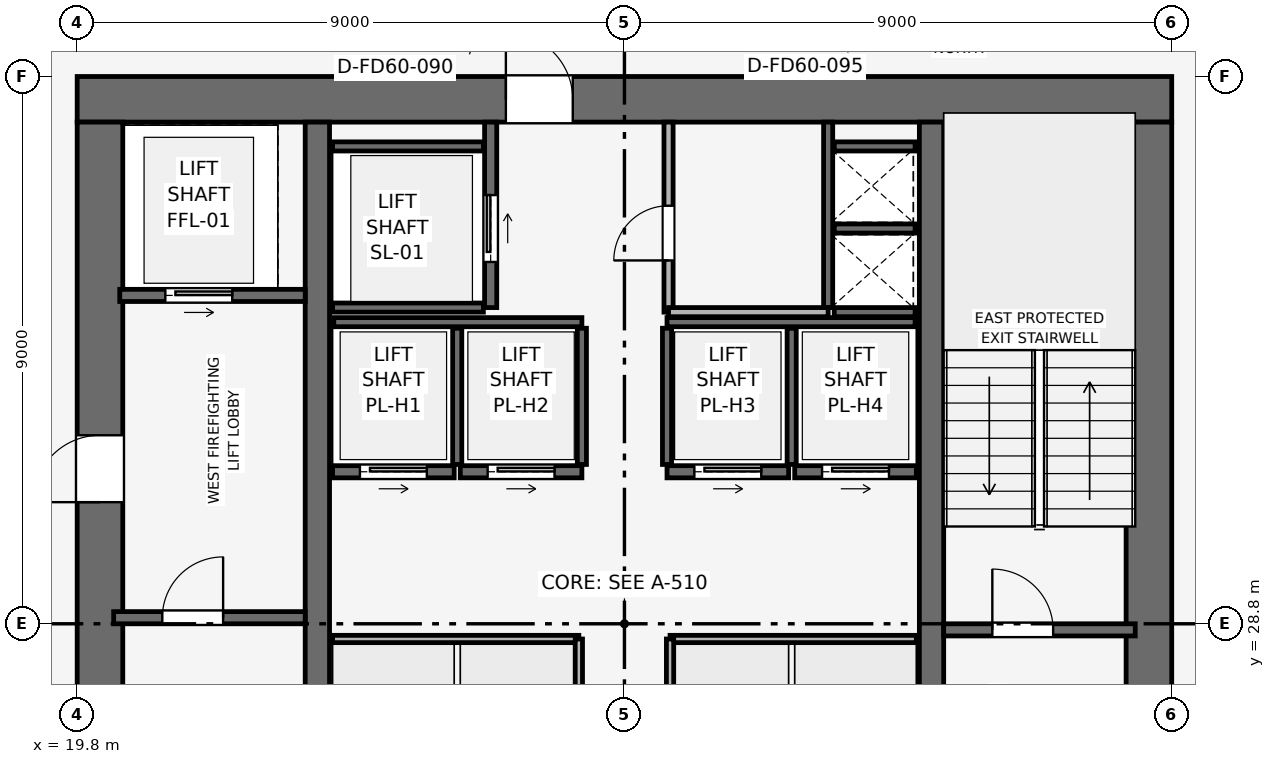
"""IFC4 building model, lengths in metres.
Left out: names, types, materials, properties, quantities, classifications, styles, units other than length and angle.
Written with IfcOpenShell. Run it as: python <this file> out.ifc"""

import sys

from ifc_helpers import new_model, si_unit, direction, frame, frame_2d, origin, place, context, subcontext, project, spatial, rectangle, extrude, element, fill, save


model = new_model("IFC4")
c1 = context("Model", 3, precision=1e-05, world=origin(), true_north=direction((0.0, 1.0)))
c2 = subcontext(c1, "Body", "Model", "MODEL_VIEW")
j1 = project(units=[si_unit("LENGTHUNIT", "METRE"), si_unit("PLANEANGLEUNIT", "RADIAN")], contexts=[c1])
p1 = place(None, origin())
s1 = spatial("IfcSite", under=j1, at=p1, CompositionType="ELEMENT")
p2 = place(p1, origin())
s2 = spatial("IfcBuilding", under=s1, at=p2, CompositionType="ELEMENT")
p3 = place(p2, frame((0.0, 0.0, 272.85)))
s3 = spatial("IfcBuildingStorey", under=s2, at=p3, CompositionType="ELEMENT", Elevation=272.85)
p4 = place(p3, frame((19.8, 37.425, 0.0), z_axis=(0.0, 0.0, 1.0), x_axis=(1.0, 0.0, 0.0)))
e1 = element("IfcWall", 1, at=p4, inside=s3, PredefinedType="SHEAR", context=c2, shape_type="SweptSolid", body=[
    extrude(rectangle(XDim=18.0, YDim=0.75, at=frame_2d((9.0, 0.0))), origin(), (0.0, 0.0, 1.0), 3.75),
])
p5 = place(p4, frame((7.05, 0.0, 0.0)))
e2 = element("IfcOpeningElement", 2, at=p5, cuts=e1, PredefinedType="OPENING", context=c2, shape_type="SweptSolid", body=[
    extrude(rectangle(XDim=1.1, YDim=2.15, at=frame_2d((0.55, 1.075))), frame((0.0, 0.385, 0.0), z_axis=(0.0, -1.0, 0.0), x_axis=(1.0, 0.0, 0.0)), (0.0, 0.0, 1.0), 0.77),
])
p6 = place(p3, frame((20.175, 20.55, 0.0), z_axis=(0.0, 0.0, 1.0), x_axis=(0.0, 1.0, 0.0)))
e3 = element("IfcWall", 3, at=p6, inside=s3, PredefinedType="SHEAR", context=c2, shape_type="SweptSolid", body=[
    extrude(rectangle(XDim=16.5, YDim=0.75, at=frame_2d((8.25, 0.0))), origin(), (0.0, 0.0, 1.0), 3.75),
])
p7 = place(p6, frame((10.25, 0.0, 0.0)))
e4 = element("IfcOpeningElement", 4, at=p7, cuts=e3, PredefinedType="OPENING", context=c2, shape_type="SweptSolid", body=[
    extrude(rectangle(XDim=1.1, YDim=2.15, at=frame_2d((0.55, 1.075))), frame((0.0, 0.385, 0.0), z_axis=(0.0, -1.0, 0.0), x_axis=(1.0, 0.0, 0.0)), (0.0, 0.0, 1.0), 0.77),
])
p8 = place(p3, frame((37.425, 20.55, 0.0), z_axis=(0.0, 0.0, 1.0), x_axis=(0.0, 1.0, 0.0)))
e5 = element("IfcWall", 5, at=p8, inside=s3, PredefinedType="SHEAR", context=c2, shape_type="SweptSolid", body=[
    extrude(rectangle(XDim=16.5, YDim=0.75, at=frame_2d((8.25, 0.0))), origin(), (0.0, 0.0, 1.0), 3.75),
])
p9 = place(p8, frame((4.75, 0.0, 0.0)))
e6 = element("IfcOpeningElement", 6, at=p9, cuts=e5, PredefinedType="OPENING", context=c2, shape_type="SweptSolid", body=[
    extrude(rectangle(XDim=1.1, YDim=2.15, at=frame_2d((0.55, 1.075))), frame((0.0, 0.385, 0.0), z_axis=(0.0, -1.0, 0.0), x_axis=(1.0, 0.0, 0.0)), (0.0, 0.0, 1.0), 0.77),
])
for number, where, z_axis, x_axis in (
    (7, (23.75, 20.55, 0.0), (0.0, 0.0, 1.0), (0.0, 1.0, 0.0)),
    (8, (33.85, 20.55, 0.0), (0.0, 0.0, 1.0), (0.0, 1.0, 0.0)),
):
    element("IfcWall", number, at=place(p3, frame(where, z_axis=z_axis, x_axis=x_axis)), inside=s3, PredefinedType="SHEAR", context=c2, shape_type="SweptSolid", body=[
        extrude(rectangle(XDim=16.5, YDim=0.4, at=frame_2d((8.25, 0.0))), origin(), (0.0, 0.0, 1.0), 3.75),
    ])
p10 = place(p3, frame((20.4, 28.9, 0.0), z_axis=(0.0, 0.0, 1.0), x_axis=(1.0, 0.0, 0.0)))
e9 = element("IfcWall", 9, at=p10, inside=s3, PredefinedType="SHEAR", context=c2, shape_type="SweptSolid", body=[
    extrude(rectangle(XDim=3.15, YDim=0.2, at=frame_2d((1.575, 0.0))), origin(), (0.0, 0.0, 1.0), 3.5),
])
p11 = place(p10, frame((0.8, 0.0, 0.0)))
e10 = element("IfcOpeningElement", 10, at=p11, cuts=e9, PredefinedType="OPENING", context=c2, shape_type="SweptSolid", body=[
    extrude(rectangle(XDim=1.0, YDim=2.1, at=frame_2d((0.5, 1.05))), frame((0.0, 0.11, 0.0), z_axis=(0.0, -1.0, 0.0), x_axis=(1.0, 0.0, 0.0)), (0.0, 0.0, 1.0), 0.22),
])
p12 = place(p3, frame((34.05, 28.7, 0.0), z_axis=(0.0, 0.0, 1.0), x_axis=(1.0, 0.0, 0.0)))
e11 = element("IfcWall", 11, at=p12, inside=s3, PredefinedType="SHEAR", context=c2, shape_type="SweptSolid", body=[
    extrude(rectangle(XDim=3.15, YDim=0.2, at=frame_2d((1.575, 0.0))), origin(), (0.0, 0.0, 1.0), 3.5),
])
p13 = place(p12, frame((0.8, 0.0, 0.0)))
e12 = element("IfcOpeningElement", 12, at=p13, cuts=e11, PredefinedType="OPENING", context=c2, shape_type="SweptSolid", body=[
    extrude(rectangle(XDim=1.0, YDim=2.1, at=frame_2d((0.5, 1.05))), frame((0.0, 0.11, 0.0), z_axis=(0.0, -1.0, 0.0), x_axis=(1.0, 0.0, 0.0)), (0.0, 0.0, 1.0), 0.22),
])
p14 = place(p3, frame((32.15, 34.0, 0.0), z_axis=(0.0, 0.0, 1.0), x_axis=(0.0, 1.0, 0.0)))
e13 = element("IfcWall", 13, at=p14, inside=s3, PredefinedType="SHEAR", context=c2, shape_type="SweptSolid", body=[
    extrude(rectangle(XDim=3.05, YDim=0.15, at=frame_2d((1.525, 0.0))), origin(), (0.0, 0.0, 1.0), 3.5),
])
for number, where, z_axis, x_axis in (
    (14, (32.25, 33.925, 0.0), (0.0, 0.0, 1.0), (1.0, 0.0, 0.0)),
    (15, (32.25, 35.3, 0.0), (0.0, 0.0, 1.0), (1.0, 0.0, 0.0)),
):
    element("IfcWall", number, at=place(p3, frame(where, z_axis=z_axis, x_axis=x_axis)), inside=s3, PredefinedType="SHEAR", context=c2, shape_type="SweptSolid", body=[
        extrude(rectangle(XDim=1.33, YDim=0.15, at=frame_2d((0.665, 0.0))), origin(), (0.0, 0.0, 1.0), 3.5),
    ])
p15 = place(p3, frame((20.5, 34.2, 0.0), z_axis=(0.0, 0.0, 1.0), x_axis=(1.0, 0.0, 0.0)))
e16 = element("IfcWall", 16, at=p15, inside=s3, PredefinedType="SHEAR", context=c2, shape_type="SweptSolid", body=[
    extrude(rectangle(XDim=3.05, YDim=0.2, at=frame_2d((1.525, 0.0))), origin(), (0.0, 0.0, 1.0), 3.5),
])
p16 = place(p15, frame((0.75, 0.0, 0.0)))
e17 = element("IfcOpeningElement", 17, at=p16, cuts=e16, PredefinedType="OPENING", context=c2, shape_type="SweptSolid", body=[
    extrude(rectangle(XDim=1.1, YDim=2.15, at=frame_2d((0.55, 1.075))), frame((0.0, 0.11, 0.0), z_axis=(0.0, -1.0, 0.0), x_axis=(1.0, 0.0, 0.0)), (0.0, 0.0, 1.0), 0.22),
])
p17 = place(p3, frame((26.6, 34.0, 0.0), z_axis=(0.0, 0.0, 1.0), x_axis=(0.0, 1.0, 0.0)))
e18 = element("IfcWall", 18, at=p17, inside=s3, PredefinedType="SHEAR", context=c2, shape_type="SweptSolid", body=[
    extrude(rectangle(XDim=3.05, YDim=0.2, at=frame_2d((1.525, 0.0))), origin(), (0.0, 0.0, 1.0), 3.5),
])
p18 = place(p17, frame((0.75, 0.0, 0.0)))
e19 = element("IfcOpeningElement", 19, at=p18, cuts=e18, PredefinedType="OPENING", context=c2, shape_type="SweptSolid", body=[
    extrude(rectangle(XDim=1.1, YDim=2.15, at=frame_2d((0.55, 1.075))), frame((0.0, 0.11, 0.0), z_axis=(0.0, -1.0, 0.0), x_axis=(1.0, 0.0, 0.0)), (0.0, 0.0, 1.0), 0.22),
])
for number, where, z_axis, x_axis in (
    (20, (24.0, 34.0, 0.0), (0.0, 0.0, 1.0), (1.0, 0.0, 0.0)),
    (21, (24.0, 36.65, 0.0), (0.0, 0.0, 1.0), (1.0, 0.0, 0.0)),
):
    element("IfcWall", number, at=place(p3, frame(where, z_axis=z_axis, x_axis=x_axis)), inside=s3, PredefinedType="SHEAR", context=c2, shape_type="SweptSolid", body=[
        extrude(rectangle(XDim=2.48, YDim=0.15, at=frame_2d((1.24, 0.0))), origin(), (0.0, 0.0, 1.0), 3.5),
    ])
p19 = place(p3, frame((24.0, 31.3, 0.0), z_axis=(0.0, 0.0, 1.0), x_axis=(1.0, 0.0, 0.0)))
e22 = element("IfcWall", 22, at=p19, inside=s3, PredefinedType="SHEAR", context=c2, shape_type="SweptSolid", body=[
    extrude(rectangle(XDim=2.0, YDim=0.2, at=frame_2d((1.0, 0.0))), origin(), (0.0, 0.0, 1.0), 3.5),
])
p20 = place(p19, frame((0.45, 0.0, 0.0)))
e23 = element("IfcOpeningElement", 23, at=p20, cuts=e22, PredefinedType="OPENING", context=c2, shape_type="SweptSolid", body=[
    extrude(rectangle(XDim=1.1, YDim=2.15, at=frame_2d((0.55, 1.075))), frame((0.0, 0.11, 0.0), z_axis=(0.0, -1.0, 0.0), x_axis=(1.0, 0.0, 0.0)), (0.0, 0.0, 1.0), 0.22),
])
p21 = place(p3, frame((26.1, 31.3, 0.0), z_axis=(0.0, 0.0, 1.0), x_axis=(1.0, 0.0, 0.0)))
e24 = element("IfcWall", 24, at=p21, inside=s3, PredefinedType="SHEAR", context=c2, shape_type="SweptSolid", body=[
    extrude(rectangle(XDim=2.0, YDim=0.2, at=frame_2d((1.0, 0.0))), origin(), (0.0, 0.0, 1.0), 3.5),
])
p22 = place(p21, frame((0.45, 0.0, 0.0)))
e25 = element("IfcOpeningElement", 25, at=p22, cuts=e24, PredefinedType="OPENING", context=c2, shape_type="SweptSolid", body=[
    extrude(rectangle(XDim=1.1, YDim=2.15, at=frame_2d((0.55, 1.075))), frame((0.0, 0.11, 0.0), z_axis=(0.0, -1.0, 0.0), x_axis=(1.0, 0.0, 0.0)), (0.0, 0.0, 1.0), 0.22),
])
p23 = place(p3, frame((29.5, 31.3, 0.0), z_axis=(0.0, 0.0, 1.0), x_axis=(1.0, 0.0, 0.0)))
e26 = element("IfcWall", 26, at=p23, inside=s3, PredefinedType="SHEAR", context=c2, shape_type="SweptSolid", body=[
    extrude(rectangle(XDim=2.0, YDim=0.2, at=frame_2d((1.0, 0.0))), origin(), (0.0, 0.0, 1.0), 3.5),
])
p24 = place(p23, frame((0.45, 0.0, 0.0)))
e27 = element("IfcOpeningElement", 27, at=p24, cuts=e26, PredefinedType="OPENING", context=c2, shape_type="SweptSolid", body=[
    extrude(rectangle(XDim=1.1, YDim=2.15, at=frame_2d((0.55, 1.075))), frame((0.0, 0.11, 0.0), z_axis=(0.0, -1.0, 0.0), x_axis=(1.0, 0.0, 0.0)), (0.0, 0.0, 1.0), 0.22),
])
p25 = place(p3, frame((31.6, 31.3, 0.0), z_axis=(0.0, 0.0, 1.0), x_axis=(1.0, 0.0, 0.0)))
e28 = element("IfcWall", 28, at=p25, inside=s3, PredefinedType="SHEAR", context=c2, shape_type="SweptSolid", body=[
    extrude(rectangle(XDim=2.0, YDim=0.2, at=frame_2d((1.0, 0.0))), origin(), (0.0, 0.0, 1.0), 3.5),
])
p26 = place(p25, frame((0.45, 0.0, 0.0)))
e29 = element("IfcOpeningElement", 29, at=p26, cuts=e28, PredefinedType="OPENING", context=c2, shape_type="SweptSolid", body=[
    extrude(rectangle(XDim=1.1, YDim=2.15, at=frame_2d((0.55, 1.075))), frame((0.0, 0.11, 0.0), z_axis=(0.0, -1.0, 0.0), x_axis=(1.0, 0.0, 0.0)), (0.0, 0.0, 1.0), 0.22),
])
p27 = place(p3, frame((32.25, 36.65, 0.0), z_axis=(0.0, 0.0, 1.0), x_axis=(1.0, 0.0, 0.0)))
e30 = element("IfcWall", 30, at=p27, inside=s3, PredefinedType="SHEAR", context=c2, shape_type="SweptSolid", body=[
    extrude(rectangle(XDim=1.33, YDim=0.15, at=frame_2d((0.665, 0.0))), origin(), (0.0, 0.0, 1.0), 3.5),
])
for number, where, z_axis, x_axis in (
    (31, (24.02, 33.76, 0.0), (0.0, 0.0, 1.0), (1.0, 0.0, 0.0)),
    (32, (29.5, 33.76, 0.0), (0.0, 0.0, 1.0), (1.0, 0.0, 0.0)),
):
    element("IfcWall", number, at=place(p3, frame(where, z_axis=z_axis, x_axis=x_axis)), inside=s3, PredefinedType="SHEAR", context=c2, shape_type="SweptSolid", body=[
        extrude(rectangle(XDim=4.08, YDim=0.15, at=frame_2d((2.04, 0.0))), origin(), (0.0, 0.0, 1.0), 3.5),
    ])
for number, where, z_axis, x_axis in (
    (33, (26.05, 31.42, 0.0), (0.0, 0.0, 1.0), (0.0, 1.0, 0.0)),
    (34, (28.1, 31.42, 0.0), (0.0, 0.0, 1.0), (0.0, 1.0, 0.0)),
    (35, (29.5, 31.42, 0.0), (0.0, 0.0, 1.0), (0.0, 1.0, 0.0)),
    (36, (31.55, 31.42, 0.0), (0.0, 0.0, 1.0), (0.0, 1.0, 0.0)),
):
    element("IfcWall", number, at=place(p3, frame(where, z_axis=z_axis, x_axis=x_axis)), inside=s3, PredefinedType="SHEAR", context=c2, shape_type="SweptSolid", body=[
        extrude(rectangle(XDim=2.24, YDim=0.15, at=frame_2d((1.12, 0.0))), origin(), (0.0, 0.0, 1.0), 3.5),
    ])
p28 = place(p3, frame((29.525, 33.925, 0.0), z_axis=(0.0, 0.0, 1.0), x_axis=(0.0, 1.0, 0.0)))
e37 = element("IfcWall", 37, at=p28, inside=s3, PredefinedType="PARTITIONING", context=c2, shape_type="SweptSolid", body=[
    extrude(rectangle(XDim=3.125, YDim=0.15, at=frame_2d((1.562, 0.0))), origin(), (0.0, 0.0, 1.0), 3.5),
])
p29 = place(p28, frame((0.85, 0.0, 0.0)))
e38 = element("IfcOpeningElement", 38, at=p29, cuts=e37, PredefinedType="OPENING", context=c2, shape_type="SweptSolid", body=[
    extrude(rectangle(XDim=0.9, YDim=2.1, at=frame_2d((0.45, 1.05))), frame((0.0, 0.085, 0.0), z_axis=(0.0, -1.0, 0.0), x_axis=(1.0, 0.0, 0.0)), (0.0, 0.0, 1.0), 0.17),
])
p30 = place(p3, frame((29.525, 33.925, 0.0), z_axis=(0.0, 0.0, 1.0), x_axis=(1.0, 0.0, 0.0)))
e39 = element("IfcWall", 39, at=p30, inside=s3, PredefinedType="PARTITIONING", context=c2, shape_type="SweptSolid", body=[
    extrude(rectangle(XDim=2.625, YDim=0.15, at=frame_2d((1.312, 0.0))), origin(), (0.0, 0.0, 1.0), 3.5),
])
p31 = place(p3, frame((24.0, 28.55, 0.0), z_axis=(0.0, 0.0, 1.0), x_axis=(1.0, 0.0, 0.0)))
e40 = element("IfcWall", 40, at=p31, inside=s3, PredefinedType="PARTITIONING", context=c2, shape_type="SweptSolid", body=[
    extrude(rectangle(XDim=4.05, YDim=0.12, at=frame_2d((2.025, 0.0))), origin(), (0.0, 0.0, 1.0), 3.5),
])
p32 = place(p3, frame((28.05, 25.95, 0.0), z_axis=(0.0, 0.0, 1.0), x_axis=(0.0, 1.0, 0.0)))
e41 = element("IfcWall", 41, at=p32, inside=s3, PredefinedType="PARTITIONING", context=c2, shape_type="SweptSolid", body=[
    extrude(rectangle(XDim=2.6, YDim=0.12, at=frame_2d((1.3, 0.0))), origin(), (0.0, 0.0, 1.0), 3.5),
])
p33 = place(p3, frame((29.55, 28.55, 0.0), z_axis=(0.0, 0.0, 1.0), x_axis=(1.0, 0.0, 0.0)))
e42 = element("IfcWall", 42, at=p33, inside=s3, PredefinedType="PARTITIONING", context=c2, shape_type="SweptSolid", body=[
    extrude(rectangle(XDim=4.05, YDim=0.12, at=frame_2d((2.025, 0.0))), origin(), (0.0, 0.0, 1.0), 3.5),
])
p34 = place(p3, frame((29.55, 25.95, 0.0), z_axis=(0.0, 0.0, 1.0), x_axis=(0.0, 1.0, 0.0)))
e43 = element("IfcWall", 43, at=p34, inside=s3, PredefinedType="PARTITIONING", context=c2, shape_type="SweptSolid", body=[
    extrude(rectangle(XDim=2.6, YDim=0.12, at=frame_2d((1.3, 0.0))), origin(), (0.0, 0.0, 1.0), 3.5),
])
p35 = place(p11, origin())
e44 = element("IfcDoor", 44, at=p35, inside=s3, OperationType="SINGLE_SWING_RIGHT", PredefinedType="DOOR", context=c2, shape_type="SweptSolid", body=[
    extrude(rectangle(XDim=1.0, YDim=2.1, at=frame_2d((0.5, 1.05))), frame((0.0, 0.025, 0.0), z_axis=(0.0, -1.0, 0.0), x_axis=(1.0, 0.0, 0.0)), (0.0, 0.0, 1.0), 0.05),
])
fill(e10, e44)
p36 = place(p13, origin())
e45 = element("IfcDoor", 45, at=p36, inside=s3, OperationType="SINGLE_SWING_LEFT", PredefinedType="DOOR", context=c2, shape_type="SweptSolid", body=[
    extrude(rectangle(XDim=1.0, YDim=2.1, at=frame_2d((0.5, 1.05))), frame((0.0, 0.025, 0.0), z_axis=(0.0, -1.0, 0.0), x_axis=(1.0, 0.0, 0.0)), (0.0, 0.0, 1.0), 0.05),
])
fill(e12, e45)
p37 = place(p16, origin())
e46 = element("IfcDoor", 46, at=p37, inside=s3, OperationType="SLIDING_TO_RIGHT", PredefinedType="DOOR", context=c2, shape_type="SweptSolid", body=[
    extrude(rectangle(XDim=1.1, YDim=2.15, at=frame_2d((0.55, 1.075))), frame((0.0, 0.025, 0.0), z_axis=(0.0, -1.0, 0.0), x_axis=(1.0, 0.0, 0.0)), (0.0, 0.0, 1.0), 0.05),
])
fill(e17, e46)
p38 = place(p18, origin())
e47 = element("IfcDoor", 47, at=p38, inside=s3, OperationType="SLIDING_TO_RIGHT", PredefinedType="DOOR", context=c2, shape_type="SweptSolid", body=[
    extrude(rectangle(XDim=1.1, YDim=2.15, at=frame_2d((0.55, 1.075))), frame((0.0, 0.025, 0.0), z_axis=(0.0, -1.0, 0.0), x_axis=(1.0, 0.0, 0.0)), (0.0, 0.0, 1.0), 0.05),
])
fill(e19, e47)
p39 = place(p20, origin())
e48 = element("IfcDoor", 48, at=p39, inside=s3, OperationType="SLIDING_TO_RIGHT", PredefinedType="DOOR", context=c2, shape_type="SweptSolid", body=[
    extrude(rectangle(XDim=1.1, YDim=2.15, at=frame_2d((0.55, 1.075))), frame((0.0, 0.025, 0.0), z_axis=(0.0, -1.0, 0.0), x_axis=(1.0, 0.0, 0.0)), (0.0, 0.0, 1.0), 0.05),
])
fill(e23, e48)
p40 = place(p22, origin())
e49 = element("IfcDoor", 49, at=p40, inside=s3, OperationType="SLIDING_TO_RIGHT", PredefinedType="DOOR", context=c2, shape_type="SweptSolid", body=[
    extrude(rectangle(XDim=1.1, YDim=2.15, at=frame_2d((0.55, 1.075))), frame((0.0, 0.025, 0.0), z_axis=(0.0, -1.0, 0.0), x_axis=(1.0, 0.0, 0.0)), (0.0, 0.0, 1.0), 0.05),
])
fill(e25, e49)
p41 = place(p24, origin())
e50 = element("IfcDoor", 50, at=p41, inside=s3, OperationType="SLIDING_TO_RIGHT", PredefinedType="DOOR", context=c2, shape_type="SweptSolid", body=[
    extrude(rectangle(XDim=1.1, YDim=2.15, at=frame_2d((0.55, 1.075))), frame((0.0, 0.025, 0.0), z_axis=(0.0, -1.0, 0.0), x_axis=(1.0, 0.0, 0.0)), (0.0, 0.0, 1.0), 0.05),
])
fill(e27, e50)
p42 = place(p26, origin())
e51 = element("IfcDoor", 51, at=p42, inside=s3, OperationType="SLIDING_TO_RIGHT", PredefinedType="DOOR", context=c2, shape_type="SweptSolid", body=[
    extrude(rectangle(XDim=1.1, YDim=2.15, at=frame_2d((0.55, 1.075))), frame((0.0, 0.025, 0.0), z_axis=(0.0, -1.0, 0.0), x_axis=(1.0, 0.0, 0.0)), (0.0, 0.0, 1.0), 0.05),
])
fill(e29, e51)
p43 = place(p29, origin())
e52 = element("IfcDoor", 52, at=p43, inside=s3, OperationType="SINGLE_SWING_LEFT", PredefinedType="DOOR", context=c2, shape_type="SweptSolid", body=[
    extrude(rectangle(XDim=0.9, YDim=2.1, at=frame_2d((0.45, 1.05))), frame((0.0, 0.025, 0.0), z_axis=(0.0, -1.0, 0.0), x_axis=(1.0, 0.0, 0.0)), (0.0, 0.0, 1.0), 0.05),
])
fill(e38, e52)
p44 = place(p7, origin())
e53 = element("IfcDoor", 53, at=p44, inside=s3, OperationType="SINGLE_SWING_LEFT", PredefinedType="DOOR", context=c2, shape_type="SweptSolid", body=[
    extrude(rectangle(XDim=1.1, YDim=2.15, at=frame_2d((0.55, 1.075))), frame((0.0, 0.025, 0.0), z_axis=(0.0, -1.0, 0.0), x_axis=(1.0, 0.0, 0.0)), (0.0, 0.0, 1.0), 0.05),
])
fill(e4, e53)
p45 = place(p5, origin())
e54 = element("IfcDoor", 54, at=p45, inside=s3, OperationType="SINGLE_SWING_LEFT", PredefinedType="DOOR", context=c2, shape_type="SweptSolid", body=[
    extrude(rectangle(XDim=1.1, YDim=2.15, at=frame_2d((0.55, 1.075))), frame((0.0, 0.025, 0.0), z_axis=(0.0, -1.0, 0.0), x_axis=(1.0, 0.0, 0.0)), (0.0, 0.0, 1.0), 0.05),
])
fill(e2, e54)
save(model, sys.argv[1])
